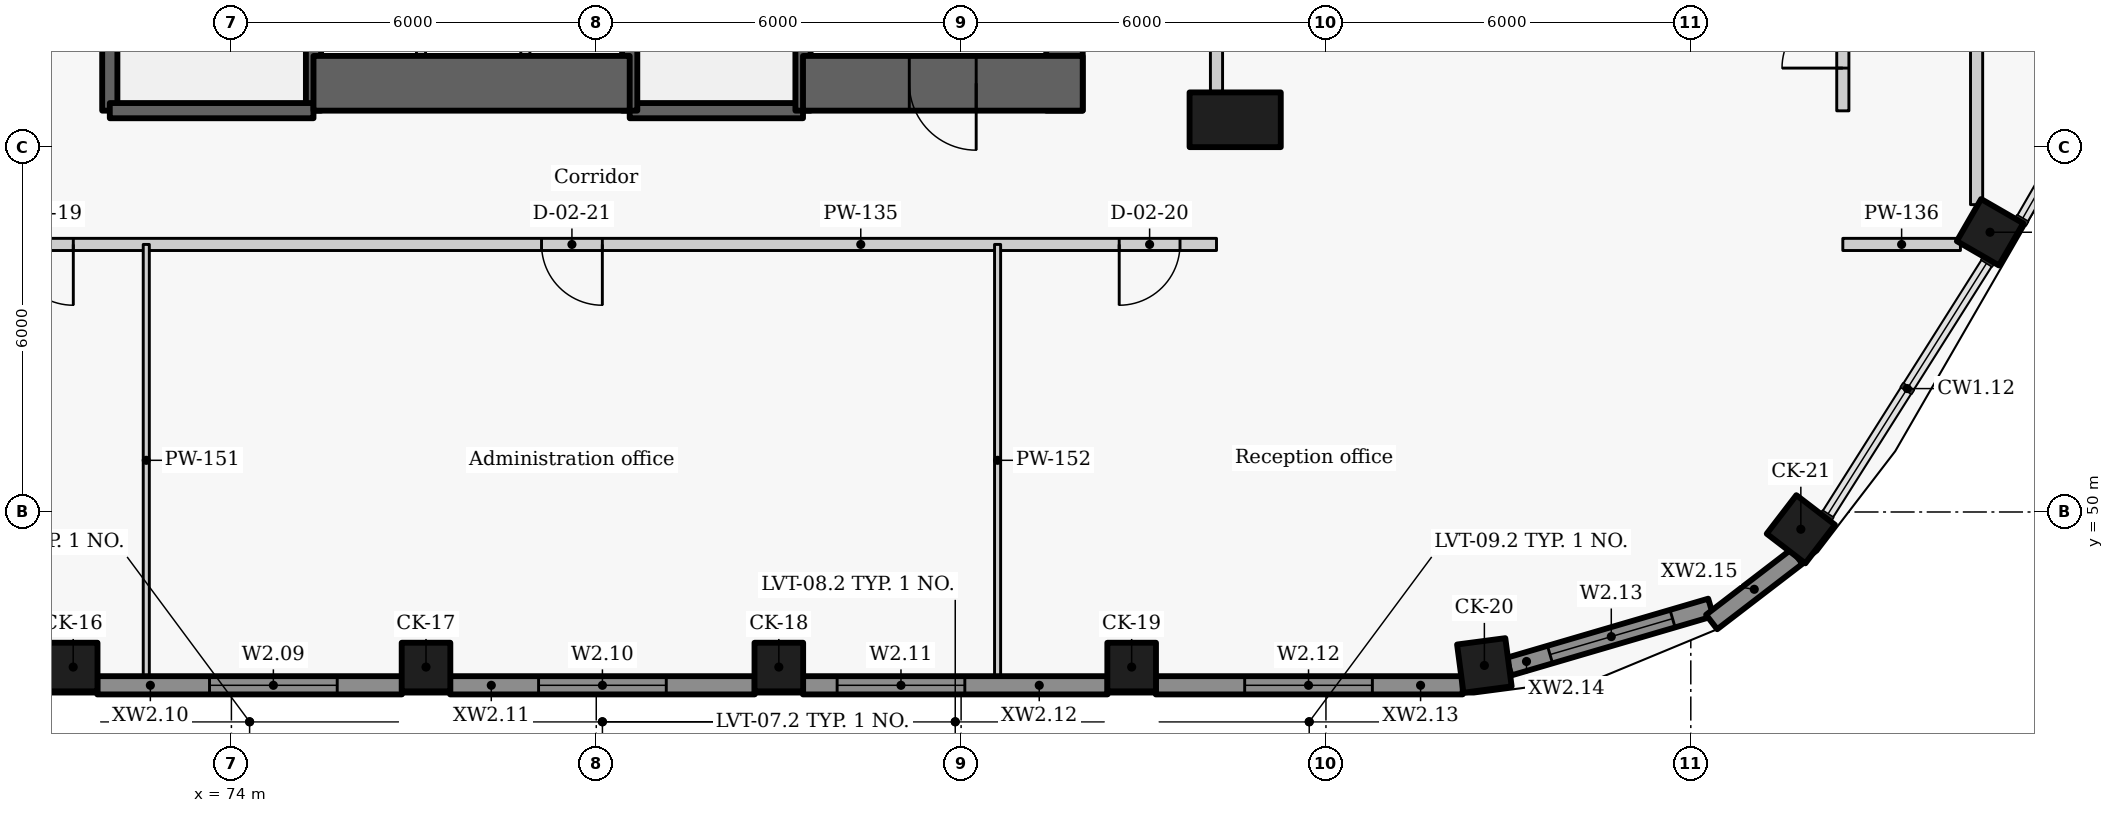
"""IFC4 building model, lengths in metres.
Left out: names, types, materials, properties, quantities, classifications, styles, units other than length and angle.
Written with IfcOpenShell. Run it as: python <this file> out.ifc"""

import sys

from ifc_helpers import new_model, si_unit, direction, frame, frame_2d, origin, origin_2d, place, context, subcontext, project, spatial, rectangle, extrude, element, fill, save


model = new_model("IFC4")
c1 = context("Model", 3, precision=1e-05, world=origin(), true_north=direction((0.0, 1.0)))
c2 = subcontext(c1, "Body", "Model", "MODEL_VIEW")
j1 = project(units=[si_unit("LENGTHUNIT", "METRE"), si_unit("PLANEANGLEUNIT", "RADIAN")], contexts=[c1])
p1 = place(None, origin())
s1 = spatial("IfcSite", under=j1, at=p1, CompositionType="ELEMENT")
p2 = place(p1, origin())
s2 = spatial("IfcBuilding", under=s1, at=p2, CompositionType="ELEMENT")
p3 = place(p2, frame((0.0, 0.0, 6.6)))
s3 = spatial("IfcBuildingStorey", under=s2, at=p3, CompositionType="ELEMENT", Elevation=6.6)
p4 = place(p3, frame((90.507, 56.45, 0.0), z_axis=(0.0, 0.0, 1.0), x_axis=(1.0, 0.0, 0.0)))
e1 = element("IfcColumn", 1, at=p4, inside=s3, PredefinedType="COLUMN", context=c2, shape_type="SweptSolid", body=[
    extrude(rectangle(XDim=1.5, YDim=0.9, at=origin_2d()), origin(), (0.0, 0.0, 1.0), 4.8),
])
for number, where, z_axis, x_axis in (
    (2, (71.398, 47.45, 0.0), (0.0, 0.0, 1.0), (1.0, 0.0, 0.0)),
    (3, (77.2, 47.45, 0.0), (0.0, 0.0, 1.0), (1.0, 0.0, 0.0)),
    (4, (83.002, 47.45, 0.0), (0.0, 0.0, 1.0), (1.0, 0.0, 0.0)),
    (5, (88.805, 47.45, 0.0), (0.0, 0.0, 1.0), (1.0, 0.0, 0.0)),
    (6, (94.605, 47.477, 0.0), (0.0, 0.0, 1.0), (0.991, 0.131, 0.0)),
    (7, (99.81, 49.716, 0.0), (0.0, 0.0, 1.0), (0.609, 0.793, 0.0)),
    (8, (102.921, 54.6, 0.0), (0.0, 0.0, 1.0), (0.5, 0.866, 0.0)),
):
    element("IfcColumn", number, at=place(p3, frame(where, z_axis=z_axis, x_axis=x_axis)), inside=s3, PredefinedType="COLUMN", context=c2, shape_type="SweptSolid", body=[
        extrude(rectangle(XDim=0.8, YDim=0.8, at=origin_2d()), origin(), (0.0, 0.0, 1.0), 4.8),
    ])
p5 = place(p3, frame((71.794, 47.15, 0.0), z_axis=(0.0, 0.0, 1.0), x_axis=(1.0, 0.0, 0.0)))
e9 = element("IfcWall", 9, at=p5, inside=s3, PredefinedType="SOLIDWALL", context=c2, shape_type="SweptSolid", body=[
    extrude(rectangle(XDim=5.01, YDim=0.3, at=frame_2d((2.505, 0.0))), origin(), (0.0, 0.0, 1.0), 3.6),
])
p6 = place(p5, frame((1.846, 0.0, 0.9)))
e10 = element("IfcOpeningElement", 10, at=p6, cuts=e9, PredefinedType="OPENING", context=c2, shape_type="SweptSolid", body=[
    extrude(rectangle(XDim=2.1, YDim=2.05, at=frame_2d((1.05, 1.025))), frame((0.0, 0.16, 0.0), z_axis=(0.0, -1.0, 0.0), x_axis=(1.0, 0.0, 0.0)), (0.0, 0.0, 1.0), 0.32),
])
p7 = place(p3, frame((77.596, 47.15, 0.0), z_axis=(0.0, 0.0, 1.0), x_axis=(1.0, 0.0, 0.0)))
e11 = element("IfcWall", 11, at=p7, inside=s3, PredefinedType="SOLIDWALL", context=c2, shape_type="SweptSolid", body=[
    extrude(rectangle(XDim=5.01, YDim=0.3, at=frame_2d((2.505, 0.0))), origin(), (0.0, 0.0, 1.0), 3.6),
])
p8 = place(p7, frame((1.455, 0.0, 0.9)))
e12 = element("IfcOpeningElement", 12, at=p8, cuts=e11, PredefinedType="OPENING", context=c2, shape_type="SweptSolid", body=[
    extrude(rectangle(XDim=2.1, YDim=2.05, at=frame_2d((1.05, 1.025))), frame((0.0, 0.16, 0.0), z_axis=(0.0, -1.0, 0.0), x_axis=(1.0, 0.0, 0.0)), (0.0, 0.0, 1.0), 0.32),
])
p9 = place(p3, frame((83.398, 47.15, 0.0), z_axis=(0.0, 0.0, 1.0), x_axis=(1.0, 0.0, 0.0)))
e13 = element("IfcWall", 13, at=p9, inside=s3, PredefinedType="SOLIDWALL", context=c2, shape_type="SweptSolid", body=[
    extrude(rectangle(XDim=5.01, YDim=0.3, at=frame_2d((2.505, 0.0))), origin(), (0.0, 0.0, 1.0), 3.6),
])
p10 = place(p9, frame((0.563, 0.0, 0.9)))
e14 = element("IfcOpeningElement", 14, at=p10, cuts=e13, PredefinedType="OPENING", context=c2, shape_type="SweptSolid", body=[
    extrude(rectangle(XDim=2.1, YDim=2.05, at=frame_2d((1.05, 1.025))), frame((0.0, 0.16, 0.0), z_axis=(0.0, -1.0, 0.0), x_axis=(1.0, 0.0, 0.0)), (0.0, 0.0, 1.0), 0.32),
])
p11 = place(p3, frame((89.201, 47.15, 0.0), z_axis=(0.0, 0.0, 1.0), x_axis=(1.0, 0.0, 0.0)))
e15 = element("IfcWall", 15, at=p11, inside=s3, PredefinedType="SOLIDWALL", context=c2, shape_type="SweptSolid", body=[
    extrude(rectangle(XDim=5.048, YDim=0.3, at=frame_2d((2.524, 0.0))), origin(), (0.0, 0.0, 1.0), 3.6),
])
p12 = place(p11, frame((1.463, 0.0, 0.9)))
e16 = element("IfcOpeningElement", 16, at=p12, cuts=e15, PredefinedType="OPENING", context=c2, shape_type="SweptSolid", body=[
    extrude(rectangle(XDim=2.1, YDim=2.05, at=frame_2d((1.05, 1.025))), frame((0.0, 0.16, 0.0), z_axis=(0.0, -1.0, 0.0), x_axis=(1.0, 0.0, 0.0)), (0.0, 0.0, 1.0), 0.32),
])
p13 = place(p3, frame((95.007, 47.457, 0.0), z_axis=(0.0, 0.0, 1.0), x_axis=(0.959578633815, 0.281440660756, 0.0)))
e17 = element("IfcWall", 17, at=p13, inside=s3, PredefinedType="SOLIDWALL", context=c2, shape_type="SweptSolid", body=[
    extrude(rectangle(XDim=3.461, YDim=0.3, at=frame_2d((1.73, 0.0))), origin(), (0.0, 0.0, 1.0), 3.6),
])
p14 = place(p13, frame((0.706, 0.0, 0.9)))
e18 = element("IfcOpeningElement", 18, at=p14, cuts=e17, PredefinedType="OPENING", context=c2, shape_type="SweptSolid", body=[
    extrude(rectangle(XDim=2.1, YDim=2.05, at=frame_2d((1.05, 1.025))), frame((0.0, 0.16, 0.0), z_axis=(0.0, -1.0, 0.0), x_axis=(1.0, 0.0, 0.0)), (0.0, 0.0, 1.0), 0.32),
])
p15 = place(p3, frame((98.343, 48.191, 0.0), z_axis=(0.0, 0.0, 1.0), x_axis=(0.793403972369, 0.608695438318, 0.0)))
e19 = element("IfcWall", 19, at=p15, inside=s3, PredefinedType="SOLIDWALL", context=c2, shape_type="SweptSolid", body=[
    extrude(rectangle(XDim=1.767, YDim=0.3, at=frame_2d((0.884, 0.0))), origin(), (0.0, 0.0, 1.0), 3.6),
])
p16 = place(p3, frame((87.7, 72.2, -0.3), z_axis=(0.0, 0.0, 1.0), x_axis=(0.0, -1.0, 0.0)))
e20 = element("IfcWall", 20, at=p16, inside=s3, PredefinedType="SHEAR", context=c2, shape_type="SweptSolid", body=[
    extrude(rectangle(XDim=15.6, YDim=0.6, at=frame_2d((7.8, 0.0))), origin(), (0.0, 0.0, 1.0), 4.8),
])
p17 = place(p16, frame((11.8, 0.0, 0.3)))
e21 = element("IfcOpeningElement", 21, at=p17, cuts=e20, PredefinedType="OPENING", context=c2, shape_type="SweptSolid", body=[
    extrude(rectangle(XDim=1.1, YDim=2.1, at=frame_2d((0.55, 1.05))), frame((0.0, 0.31, 0.0), z_axis=(0.0, -1.0, 0.0), x_axis=(1.0, 0.0, 0.0)), (0.0, 0.0, 1.0), 0.62),
])
p18 = place(p3, frame((75.35, 56.6, -0.3), z_axis=(0.0, 0.0, 1.0), x_axis=(0.0, 1.0, 0.0)))
e22 = element("IfcWall", 22, at=p18, inside=s3, PredefinedType="SHEAR", context=c2, shape_type="SweptSolid", body=[
    extrude(rectangle(XDim=5.003, YDim=0.25, at=frame_2d((2.501, 0.0))), origin(), (0.0, 0.0, 1.0), 4.8),
])
p19 = place(p3, frame((72.0, 56.6, -0.3), z_axis=(0.0, 0.0, 1.0), x_axis=(0.0, 1.0, 0.0)))
e23 = element("IfcWall", 23, at=p19, inside=s3, PredefinedType="SHEAR", context=c2, shape_type="SweptSolid", body=[
    extrude(rectangle(XDim=6.5, YDim=0.25, at=frame_2d((3.25, 0.0))), origin(), (0.0, 0.0, 1.0), 4.8),
])
p20 = place(p3, frame((72.0, 56.6, -0.3), z_axis=(0.0, 0.0, 1.0), x_axis=(1.0, 0.0, 0.0)))
e24 = element("IfcWall", 24, at=p20, inside=s3, PredefinedType="SHEAR", context=c2, shape_type="SweptSolid", body=[
    extrude(rectangle(XDim=3.35, YDim=0.25, at=frame_2d((1.675, 0.0))), origin(), (0.0, 0.0, 1.0), 4.8),
])
p21 = place(p3, frame((80.55, 56.6, -0.3), z_axis=(0.0, 0.0, 1.0), x_axis=(1.0, 0.0, 0.0)))
e25 = element("IfcWall", 25, at=p21, inside=s3, PredefinedType="SHEAR", context=c2, shape_type="SweptSolid", body=[
    extrude(rectangle(XDim=2.85, YDim=0.25, at=frame_2d((1.425, 0.0))), origin(), (0.0, 0.0, 1.0), 4.8),
])
p22 = place(p3, frame((83.4, 63.1, -0.3), z_axis=(0.0, 0.0, 1.0), x_axis=(0.0, -1.0, 0.0)))
e26 = element("IfcWall", 26, at=p22, inside=s3, PredefinedType="SHEAR", context=c2, shape_type="SweptSolid", body=[
    extrude(rectangle(XDim=6.5, YDim=0.25, at=frame_2d((3.25, 0.0))), origin(), (0.0, 0.0, 1.0), 4.8),
])
p23 = place(p22, frame((0.25, 0.0, 0.3)))
e27 = element("IfcOpeningElement", 27, at=p23, cuts=e26, PredefinedType="OPENING", context=c2, shape_type="SweptSolid", body=[
    extrude(rectangle(XDim=0.9, YDim=2.1, at=frame_2d((0.45, 1.05))), frame((0.0, 0.135, 0.0), z_axis=(0.0, -1.0, 0.0), x_axis=(1.0, 0.0, 0.0)), (0.0, 0.0, 1.0), 0.27),
])
p24 = place(p3, frame((80.55, 56.6, -0.3), z_axis=(0.0, 0.0, 1.0), x_axis=(0.0, 1.0, 0.0)))
e28 = element("IfcWall", 28, at=p24, inside=s3, PredefinedType="SHEAR", context=c2, shape_type="SweptSolid", body=[
    extrude(rectangle(XDim=5.003, YDim=0.25, at=frame_2d((2.501, 0.0))), origin(), (0.0, 0.0, 1.0), 4.8),
])
p25 = place(p3, frame((75.35, 57.05, -0.3), z_axis=(0.0, 0.0, 1.0), x_axis=(1.0, 0.0, 0.0)))
e29 = element("IfcWall", 29, at=p25, inside=s3, PredefinedType="SHEAR", context=c2, shape_type="SweptSolid", body=[
    extrude(rectangle(XDim=5.2, YDim=0.9, at=frame_2d((2.6, 0.0))), origin(), (0.0, 0.0, 1.0), 4.8),
])
p26 = place(p3, frame((88.0, 57.05, -0.3), z_axis=(0.0, 0.0, 1.0), x_axis=(-1.0, 0.0, 0.0)))
e30 = element("IfcWall", 30, at=p26, inside=s3, PredefinedType="SHEAR", context=c2, shape_type="SweptSolid", body=[
    extrude(rectangle(XDim=4.6, YDim=0.9, at=frame_2d((2.3, 0.0))), origin(), (0.0, 0.0, 1.0), 4.8),
])
p27 = place(p26, frame((1.752, 0.0, 0.3)))
e31 = element("IfcOpeningElement", 31, at=p27, cuts=e30, PredefinedType="OPENING", context=c2, shape_type="SweptSolid", body=[
    extrude(rectangle(XDim=1.1, YDim=2.1, at=frame_2d((0.55, 1.05))), frame((0.0, 0.46, 0.0), z_axis=(0.0, -1.0, 0.0), x_axis=(1.0, 0.0, 0.0)), (0.0, 0.0, 1.0), 0.92),
])
for number, where, z_axis, x_axis in (
    (32, (77.118, 56.6, 0.0), (0.0, 0.0, 1.0), (0.0, 1.0, 0.0)),
    (33, (78.834, 56.6, 0.0), (0.0, 0.0, 1.0), (0.0, 1.0, 0.0)),
):
    element("IfcWall", number, at=place(p3, frame(where, z_axis=z_axis, x_axis=x_axis)), inside=s3, PredefinedType="PARTITIONING", context=c2, shape_type="SweptSolid", body=[
        extrude(rectangle(XDim=5.0, YDim=0.15, at=frame_2d((2.5, 0.0))), origin(), (0.0, 0.0, 1.0), 4.5),
    ])
p28 = place(p3, frame((102.7, 61.553, 0.0), z_axis=(0.0, 0.0, 1.0), x_axis=(0.0, -1.0, 0.0)))
e34 = element("IfcWall", 34, at=p28, inside=s3, PredefinedType="PARTITIONING", context=c2, shape_type="SweptSolid", body=[
    extrude(rectangle(XDim=6.499, YDim=0.2, at=frame_2d((3.249, 0.0))), origin(), (0.0, 0.0, 1.0), 4.5),
])
p29 = place(p28, frame((2.75, 0.0, 0.0)))
e35 = element("IfcOpeningElement", 35, at=p29, cuts=e34, PredefinedType="OPENING", context=c2, shape_type="SweptSolid", body=[
    extrude(rectangle(XDim=1.0, YDim=2.1, at=frame_2d((0.5, 1.05))), frame((0.0, 0.11, 0.0), z_axis=(0.0, -1.0, 0.0), x_axis=(1.0, 0.0, 0.0)), (0.0, 0.0, 1.0), 0.22),
])
p30 = place(p3, frame((100.5, 56.597, 0.0), z_axis=(0.0, 0.0, 1.0), x_axis=(0.0, 1.0, 0.0)))
e36 = element("IfcWall", 36, at=p30, inside=s3, PredefinedType="PARTITIONING", context=c2, shape_type="SweptSolid", body=[
    extrude(rectangle(XDim=10.873, YDim=0.2, at=frame_2d((5.437, 0.0))), origin(), (0.0, 0.0, 1.0), 4.5),
])
p31 = place(p30, frame((5.003, 0.0, 0.0)))
e37 = element("IfcOpeningElement", 37, at=p31, cuts=e36, PredefinedType="OPENING", context=c2, shape_type="SweptSolid", body=[
    extrude(rectangle(XDim=1.0, YDim=2.1, at=frame_2d((0.5, 1.05))), frame((0.0, 0.11, 0.0), z_axis=(0.0, -1.0, 0.0), x_axis=(1.0, 0.0, 0.0)), (0.0, 0.0, 1.0), 0.22),
])
p32 = place(p30, frame((0.703, 0.0, 0.0)))
e38 = element("IfcOpeningElement", 38, at=p32, cuts=e36, PredefinedType="OPENING", context=c2, shape_type="SweptSolid", body=[
    extrude(rectangle(XDim=1.0, YDim=2.1, at=frame_2d((0.5, 1.05))), frame((0.0, 0.11, 0.0), z_axis=(0.0, -1.0, 0.0), x_axis=(1.0, 0.0, 0.0)), (0.0, 0.0, 1.0), 0.22),
])
p33 = place(p3, frame((90.2, 56.917, 0.0), z_axis=(0.0, 0.0, 1.0), x_axis=(0.0, 1.0, 0.0)))
e39 = element("IfcWall", 39, at=p33, inside=s3, PredefinedType="PARTITIONING", context=c2, shape_type="SweptSolid", body=[
    extrude(rectangle(XDim=1.516, YDim=0.2, at=frame_2d((0.758, 0.0))), origin(), (0.0, 0.0, 1.0), 4.5),
])
p34 = place(p3, frame((90.2, 54.4, 0.0), z_axis=(0.0, 0.0, 1.0), x_axis=(-1.0, 0.0, 0.0)))
e40 = element("IfcWall", 40, at=p34, inside=s3, PredefinedType="PARTITIONING", context=c2, shape_type="SweptSolid", body=[
    extrude(rectangle(XDim=20.4, YDim=0.2, at=frame_2d((10.2, 0.0))), origin(), (0.0, 0.0, 1.0), 4.5),
])
p35 = place(p34, frame((18.8, 0.0, 0.0)))
e41 = element("IfcOpeningElement", 41, at=p35, cuts=e40, PredefinedType="OPENING", context=c2, shape_type="SweptSolid", body=[
    extrude(rectangle(XDim=1.0, YDim=2.1, at=frame_2d((0.5, 1.05))), frame((0.0, 0.11, 0.0), z_axis=(0.0, -1.0, 0.0), x_axis=(1.0, 0.0, 0.0)), (0.0, 0.0, 1.0), 0.22),
])
p36 = place(p34, frame((0.6, 0.0, 0.0)))
e42 = element("IfcOpeningElement", 42, at=p36, cuts=e40, PredefinedType="OPENING", context=c2, shape_type="SweptSolid", body=[
    extrude(rectangle(XDim=1.0, YDim=2.1, at=frame_2d((0.5, 1.05))), frame((0.0, 0.11, 0.0), z_axis=(0.0, -1.0, 0.0), x_axis=(1.0, 0.0, 0.0)), (0.0, 0.0, 1.0), 0.22),
])
p37 = place(p34, frame((10.1, 0.0, 0.0)))
e43 = element("IfcOpeningElement", 43, at=p37, cuts=e40, PredefinedType="OPENING", context=c2, shape_type="SweptSolid", body=[
    extrude(rectangle(XDim=1.0, YDim=2.1, at=frame_2d((0.5, 1.05))), frame((0.0, 0.11, 0.0), z_axis=(0.0, -1.0, 0.0), x_axis=(1.0, 0.0, 0.0)), (0.0, 0.0, 1.0), 0.22),
])
p38 = place(p3, frame((100.5, 54.4, 0.0), z_axis=(0.0, 0.0, 1.0), x_axis=(1.0, 0.0, 0.0)))
e44 = element("IfcWall", 44, at=p38, inside=s3, PredefinedType="PARTITIONING", context=c2, shape_type="SweptSolid", body=[
    extrude(rectangle(XDim=1.934, YDim=0.2, at=frame_2d((0.967, 0.0))), origin(), (0.0, 0.0, 1.0), 4.5),
])
for number, where, z_axis, x_axis in (
    (45, (72.6, 47.3, 0.0), (0.0, 0.0, 1.0), (0.0, 1.0, 0.0)),
    (46, (86.6, 47.3, 0.0), (0.0, 0.0, 1.0), (0.0, 1.0, 0.0)),
):
    element("IfcWall", number, at=place(p3, frame(where, z_axis=z_axis, x_axis=x_axis)), inside=s3, PredefinedType="PARTITIONING", context=c2, shape_type="SweptSolid", body=[
        extrude(rectangle(XDim=7.1, YDim=0.1, at=frame_2d((3.55, 0.0))), origin(), (0.0, 0.0, 1.0), 3.73),
    ])
p39 = place(p6, origin())
e47 = element("IfcWindow", 47, at=p39, inside=s3, PartitioningType="SINGLE_PANEL", PredefinedType="WINDOW", context=c2, shape_type="SweptSolid", body=[
    extrude(rectangle(XDim=2.1, YDim=2.05, at=frame_2d((1.05, 1.025))), frame((0.0, 0.03, 0.0), z_axis=(0.0, -1.0, 0.0), x_axis=(1.0, 0.0, 0.0)), (0.0, 0.0, 1.0), 0.06),
])
fill(e10, e47)
p40 = place(p8, origin())
e48 = element("IfcWindow", 48, at=p40, inside=s3, PartitioningType="SINGLE_PANEL", PredefinedType="WINDOW", context=c2, shape_type="SweptSolid", body=[
    extrude(rectangle(XDim=2.1, YDim=2.05, at=frame_2d((1.05, 1.025))), frame((0.0, 0.03, 0.0), z_axis=(0.0, -1.0, 0.0), x_axis=(1.0, 0.0, 0.0)), (0.0, 0.0, 1.0), 0.06),
])
fill(e12, e48)
p41 = place(p10, origin())
e49 = element("IfcWindow", 49, at=p41, inside=s3, PartitioningType="SINGLE_PANEL", PredefinedType="WINDOW", context=c2, shape_type="SweptSolid", body=[
    extrude(rectangle(XDim=2.1, YDim=2.05, at=frame_2d((1.05, 1.025))), frame((0.0, 0.03, 0.0), z_axis=(0.0, -1.0, 0.0), x_axis=(1.0, 0.0, 0.0)), (0.0, 0.0, 1.0), 0.06),
])
fill(e14, e49)
p42 = place(p12, origin())
e50 = element("IfcWindow", 50, at=p42, inside=s3, PartitioningType="SINGLE_PANEL", PredefinedType="WINDOW", context=c2, shape_type="SweptSolid", body=[
    extrude(rectangle(XDim=2.1, YDim=2.05, at=frame_2d((1.05, 1.025))), frame((0.0, 0.03, 0.0), z_axis=(0.0, -1.0, 0.0), x_axis=(1.0, 0.0, 0.0)), (0.0, 0.0, 1.0), 0.06),
])
fill(e16, e50)
p43 = place(p14, origin())
e51 = element("IfcWindow", 51, at=p43, inside=s3, PartitioningType="SINGLE_PANEL", PredefinedType="WINDOW", context=c2, shape_type="SweptSolid", body=[
    extrude(rectangle(XDim=2.1, YDim=2.05, at=frame_2d((1.05, 1.025))), frame((0.0, 0.03, 0.0), z_axis=(0.0, -1.0, 0.0), x_axis=(1.0, 0.0, 0.0)), (0.0, 0.0, 1.0), 0.06),
])
fill(e18, e51)
p44 = place(p32, origin())
e52 = element("IfcDoor", 52, at=p44, inside=s3, OperationType="SINGLE_SWING_LEFT", PredefinedType="DOOR", context=c2, shape_type="SweptSolid", body=[
    extrude(rectangle(XDim=1.0, YDim=2.1, at=frame_2d((0.5, 1.05))), frame((0.0, 0.025, 0.0), z_axis=(0.0, -1.0, 0.0), x_axis=(1.0, 0.0, 0.0)), (0.0, 0.0, 1.0), 0.05),
])
fill(e38, e52)
p45 = place(p35, origin())
e53 = element("IfcDoor", 53, at=p45, inside=s3, OperationType="SINGLE_SWING_LEFT", PredefinedType="DOOR", context=c2, shape_type="SweptSolid", body=[
    extrude(rectangle(XDim=1.0, YDim=2.1, at=frame_2d((0.5, 1.05))), frame((0.0, 0.025, 0.0), z_axis=(0.0, -1.0, 0.0), x_axis=(1.0, 0.0, 0.0)), (0.0, 0.0, 1.0), 0.05),
])
fill(e41, e53)
p46 = place(p36, origin())
e54 = element("IfcDoor", 54, at=p46, inside=s3, OperationType="SINGLE_SWING_RIGHT", PredefinedType="DOOR", context=c2, shape_type="SweptSolid", body=[
    extrude(rectangle(XDim=1.0, YDim=2.1, at=frame_2d((0.5, 1.05))), frame((0.0, 0.025, 0.0), z_axis=(0.0, -1.0, 0.0), x_axis=(1.0, 0.0, 0.0)), (0.0, 0.0, 1.0), 0.05),
])
fill(e42, e54)
p47 = place(p37, origin())
e55 = element("IfcDoor", 55, at=p47, inside=s3, OperationType="SINGLE_SWING_LEFT", PredefinedType="DOOR", context=c2, shape_type="SweptSolid", body=[
    extrude(rectangle(XDim=1.0, YDim=2.1, at=frame_2d((0.5, 1.05))), frame((0.0, 0.025, 0.0), z_axis=(0.0, -1.0, 0.0), x_axis=(1.0, 0.0, 0.0)), (0.0, 0.0, 1.0), 0.05),
])
fill(e43, e55)
p48 = place(p27, origin())
e56 = element("IfcDoor", 56, at=p48, inside=s3, OperationType="SINGLE_SWING_LEFT", PredefinedType="DOOR", context=c2, shape_type="SweptSolid", body=[
    extrude(rectangle(XDim=1.1, YDim=2.1, at=frame_2d((0.55, 1.05))), frame((0.0, 0.025, 0.0), z_axis=(0.0, -1.0, 0.0), x_axis=(1.0, 0.0, 0.0)), (0.0, 0.0, 1.0), 0.05),
])
fill(e31, e56)
save(model, sys.argv[1])
